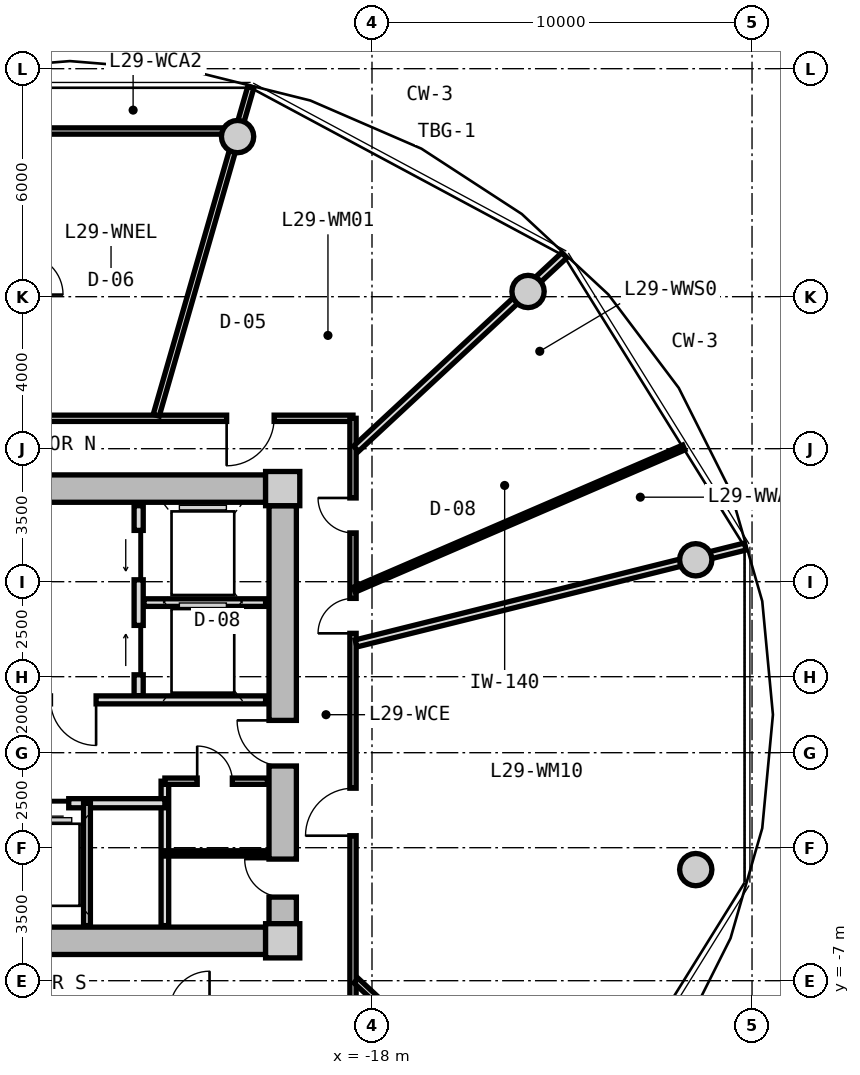
"""IFC4 building model, lengths in metres.
Left out: names, types, materials, properties, quantities, classifications, styles, units other than length and angle.
Written with IfcOpenShell. Run it as: python <this file> out.ifc"""

import sys

from ifc_helpers import new_model, si_unit, direction, frame, frame_2d, origin, origin_2d, place, context, subcontext, project, spatial, rectangle, circle, extrude, source, transform, mapped, element, fill, save


model = new_model("IFC4")
c1 = context("Model", 3, precision=1e-05, world=origin(), true_north=direction((0.0, 1.0)))
c2 = subcontext(c1, "Body", "Model", "MODEL_VIEW")
j1 = project(units=[si_unit("LENGTHUNIT", "METRE"), si_unit("PLANEANGLEUNIT", "RADIAN")], contexts=[c1])
p1 = place(None, origin())
s1 = spatial("IfcSite", under=j1, at=p1, CompositionType="ELEMENT")
p2 = place(p1, origin())
s2 = spatial("IfcBuilding", under=s1, at=p2, CompositionType="ELEMENT")
p3 = place(p2, frame((0.0, 0.0, 96.25)))
s3 = spatial("IfcBuildingStorey", under=s2, at=p3, CompositionType="ELEMENT", Elevation=96.25)
m1 = source(origin(), c2, "Body", "SweptSolid", [
    extrude(rectangle(XDim=0.9, YDim=0.9, at=origin_2d()), origin(), (0.0, 0.0, 1.0), 3.05),
])
for number, where, z_axis, x_axis in (
    (1, (-20.35, -5.95, 0.0), (0.0, 0.0, 1.0), (1.0, 0.0, 0.0)),
    (2, (-20.35, 5.95, 0.0), (0.0, 0.0, 1.0), (1.0, 0.0, 0.0)),
):
    element("IfcColumn", number, at=place(p3, frame(where, z_axis=z_axis, x_axis=x_axis)), inside=s3, PredefinedType="COLUMN", context=c2, shape_type="MappedRepresentation", body=[
        mapped(m1, transform((0.0, 0.0, 0.0), x_axis=(1.0, 0.0, 0.0), y_axis=(0.0, 1.0, 0.0), z_axis=(0.0, 0.0, 1.0), scale=1.0)),
    ])
m2 = source(origin(), c2, "Body", "SweptSolid", [
    extrude(rectangle(XDim=14.4, YDim=0.72, at=frame_2d((7.2, 0.0))), origin(), (0.0, 0.0, 1.0), 2.79),
])
for number, where, z_axis, x_axis in (
    (3, (-35.2, 5.95, 0.0), (0.0, 0.0, 1.0), (1.0, 0.0, 0.0)),
    (4, (-20.8, -5.95, 0.0), (0.0, 0.0, 1.0), (-1.0, 0.0, 0.0)),
):
    element("IfcWall", number, at=place(p3, frame(where, z_axis=z_axis, x_axis=x_axis)), inside=s3, PredefinedType="SHEAR", context=c2, shape_type="MappedRepresentation", body=[
        mapped(m2, transform((0.0, 0.0, 0.0), x_axis=(1.0, 0.0, 0.0), y_axis=(0.0, 1.0, 0.0), z_axis=(0.0, 0.0, 1.0), scale=1.0)),
    ])
m3 = source(origin(), c2, "Body", "SweptSolid", [
    extrude(rectangle(XDim=11.0, YDim=0.72, at=frame_2d((5.5, 0.0))), origin(), (0.0, 0.0, 1.0), 2.79),
])
p4 = place(p3, frame((-20.35, 5.5, 0.0), z_axis=(0.0, 0.0, 1.0), x_axis=(0.0, -1.0, 0.0)))
e5 = element("IfcWall", 5, at=p4, inside=s3, PredefinedType="SHEAR", context=c2, shape_type="MappedRepresentation", body=[
    mapped(m3, transform((0.0, 0.0, 0.0), x_axis=(1.0, 0.0, 0.0), y_axis=(0.0, 1.0, 0.0), z_axis=(0.0, 0.0, 1.0), scale=1.0)),
])
p5 = place(p4, frame((5.65, 0.0, 0.0)))
e6 = element("IfcOpeningElement", 6, at=p5, cuts=e5, PredefinedType="OPENING", context=c2, shape_type="SweptSolid", body=[
    extrude(rectangle(XDim=1.2, YDim=2.15, at=frame_2d((0.6, 1.075))), frame((0.0, 0.37, 0.0), z_axis=(0.0, -1.0, 0.0), x_axis=(1.0, 0.0, 0.0)), (0.0, 0.0, 1.0), 0.74),
])
p6 = place(p4, frame((9.3, 0.0, 0.0)))
e7 = element("IfcOpeningElement", 7, at=p6, cuts=e5, PredefinedType="OPENING", context=c2, shape_type="SweptSolid", body=[
    extrude(rectangle(XDim=1.0, YDim=2.1, at=frame_2d((0.5, 1.05))), frame((0.0, 0.37, 0.0), z_axis=(0.0, -1.0, 0.0), x_axis=(1.0, 0.0, 0.0)), (0.0, 0.0, 1.0), 0.74),
])
m4 = source(origin(), c2, "Body", "SweptSolid", [
    extrude(circle(Radius=0.425, at=origin_2d()), origin(), (0.0, 0.0, 1.0), 3.05),
])
for number, where, z_axis, x_axis in (
    (8, (-9.481, 4.076, 0.0), (0.0, 0.0, 1.0), (1.0, 0.0, 0.0)),
    (9, (-13.894, 11.137, 0.0), (0.0, 0.0, 1.0), (1.0, 0.0, 0.0)),
    (10, (-21.537, 15.213, 0.0), (0.0, 0.0, 1.0), (1.0, 0.0, 0.0)),
    (11, (-9.481, -4.076, 0.0), (0.0, 0.0, 1.0), (1.0, 0.0, 0.0)),
):
    element("IfcColumn", number, at=place(p3, frame(where, z_axis=z_axis, x_axis=x_axis)), inside=s3, PredefinedType="COLUMN", context=c2, shape_type="MappedRepresentation", body=[
        mapped(m4, transform((0.0, 0.0, 0.0), x_axis=(1.0, 0.0, 0.0), y_axis=(0.0, 1.0, 0.0), z_axis=(0.0, 0.0, 1.0), scale=1.0)),
    ])
m5 = source(origin(), c2, "Body", "SweptSolid", [
    extrude(rectangle(XDim=5.0, YDim=0.24, at=frame_2d((2.5, 0.0))), origin(), (0.0, 0.0, 1.0), 2.775),
])
p7 = place(p3, frame((-24.14, 0.5, 0.0), z_axis=(0.0, 0.0, 1.0), x_axis=(0.0, 1.0, 0.0)))
e12 = element("IfcWall", 12, at=p7, inside=s3, PredefinedType="PARTITIONING", context=c2, shape_type="MappedRepresentation", body=[
    mapped(m5, transform((0.0, 0.0, 0.0), x_axis=(1.0, 0.0, 0.0), y_axis=(0.0, 1.0, 0.0), z_axis=(0.0, 0.0, 1.0), scale=1.0)),
])
p8 = place(p7, frame((3.05, 0.0, 0.0)))
e13 = element("IfcOpeningElement", 13, at=p8, cuts=e12, PredefinedType="OPENING", context=c2, shape_type="SweptSolid", body=[
    extrude(rectangle(XDim=1.3, YDim=2.2, at=frame_2d((0.65, 1.1))), frame((0.0, 0.13, 0.0), z_axis=(0.0, -1.0, 0.0), x_axis=(1.0, 0.0, 0.0)), (0.0, 0.0, 1.0), 0.26),
])
p9 = place(p7, frame((0.55, 0.0, 0.0)))
e14 = element("IfcOpeningElement", 14, at=p9, cuts=e12, PredefinedType="OPENING", context=c2, shape_type="SweptSolid", body=[
    extrude(rectangle(XDim=1.3, YDim=2.2, at=frame_2d((0.65, 1.1))), frame((0.0, 0.13, 0.0), z_axis=(0.0, -1.0, 0.0), x_axis=(1.0, 0.0, 0.0)), (0.0, 0.0, 1.0), 0.26),
])
m6 = source(origin(), c2, "Body", "SweptSolid", [
    extrude(rectangle(XDim=3.2, YDim=0.2, at=frame_2d((1.6, 0.0))), origin(), (0.0, 0.0, 1.0), 2.775),
])
p10 = place(p3, frame((-24.0, 2.95, 0.0), z_axis=(0.0, 0.0, 1.0), x_axis=(1.0, 0.0, 0.0)))
e15 = element("IfcWall", 15, at=p10, inside=s3, PredefinedType="PARTITIONING", context=c2, shape_type="MappedRepresentation", body=[
    mapped(m6, transform((0.0, 0.0, 0.0), x_axis=(1.0, 0.0, 0.0), y_axis=(0.0, 1.0, 0.0), z_axis=(0.0, 0.0, 1.0), scale=1.0)),
])
m7 = source(origin(), c2, "Body", "SweptSolid", [
    extrude(rectangle(XDim=6.66, YDim=0.21, at=frame_2d((3.33, 0.0))), origin(), (0.0, 0.0, 1.0), 2.775),
])
p11 = place(p3, frame((-27.46, 0.39, 0.0), z_axis=(0.0, 0.0, 1.0), x_axis=(1.0, 0.0, 0.0)))
e16 = element("IfcWall", 16, at=p11, inside=s3, PredefinedType="PARTITIONING", context=c2, shape_type="MappedRepresentation", body=[
    mapped(m7, transform((0.0, 0.0, 0.0), x_axis=(1.0, 0.0, 0.0), y_axis=(0.0, 1.0, 0.0), z_axis=(0.0, 0.0, 1.0), scale=1.0)),
])
p12 = place(p11, frame((1.0, 0.0, 0.0)))
e17 = element("IfcOpeningElement", 17, at=p12, cuts=e16, PredefinedType="OPENING", context=c2, shape_type="SweptSolid", body=[
    extrude(rectangle(XDim=1.2, YDim=2.15, at=frame_2d((0.6, 1.075))), frame((0.0, 0.115, 0.0), z_axis=(0.0, -1.0, 0.0), x_axis=(1.0, 0.0, 0.0)), (0.0, 0.0, 1.0), 0.23),
])
m8 = source(origin(), c2, "Body", "SweptSolid", [
    extrude(rectangle(XDim=3.8, YDim=0.2, at=frame_2d((1.9, 0.0))), origin(), (0.0, 0.0, 1.0), 2.775),
])
p13 = place(p3, frame((-23.45, -5.55, 0.0), z_axis=(0.0, 0.0, 1.0), x_axis=(0.0, 1.0, 0.0)))
e18 = element("IfcWall", 18, at=p13, inside=s3, PredefinedType="PARTITIONING", context=c2, shape_type="MappedRepresentation", body=[
    mapped(m8, transform((0.0, 0.0, 0.0), x_axis=(1.0, 0.0, 0.0), y_axis=(0.0, 1.0, 0.0), z_axis=(0.0, 0.0, 1.0), scale=1.0)),
])
m9 = source(origin(), c2, "Body", "SweptSolid", [
    extrude(rectangle(XDim=4.13, YDim=0.24, at=frame_2d((2.065, 0.0))), origin(), (0.0, 0.0, 1.0), 2.775),
])
p14 = place(p3, frame((-27.58, -2.33, 0.0), z_axis=(0.0, 0.0, 1.0), x_axis=(1.0, 0.0, 0.0)))
e19 = element("IfcWall", 19, at=p14, inside=s3, PredefinedType="PARTITIONING", context=c2, shape_type="MappedRepresentation", body=[
    mapped(m9, transform((0.0, 0.0, 0.0), x_axis=(1.0, 0.0, 0.0), y_axis=(0.0, 1.0, 0.0), z_axis=(0.0, 0.0, 1.0), scale=1.0)),
])
p15 = place(p14, frame((0.5, 0.0, 0.0)))
e20 = element("IfcOpeningElement", 20, at=p15, cuts=e19, PredefinedType="OPENING", context=c2, shape_type="SweptSolid", body=[
    extrude(rectangle(XDim=1.1, YDim=2.2, at=frame_2d((0.55, 1.1))), frame((0.0, 0.13, 0.0), z_axis=(0.0, -1.0, 0.0), x_axis=(1.0, 0.0, 0.0)), (0.0, 0.0, 1.0), 0.26),
])
m10 = source(origin(), c2, "Body", "SweptSolid", [
    extrude(rectangle(XDim=3.22, YDim=0.18, at=frame_2d((1.61, 0.0))), origin(), (0.0, 0.0, 1.0), 2.775),
])
p16 = place(p3, frame((-25.5, -5.55, 0.0), z_axis=(0.0, 0.0, 1.0), x_axis=(0.0, 1.0, 0.0)))
e21 = element("IfcWall", 21, at=p16, inside=s3, PredefinedType="PARTITIONING", context=c2, shape_type="MappedRepresentation", body=[
    mapped(m10, transform((0.0, 0.0, 0.0), x_axis=(1.0, 0.0, 0.0), y_axis=(0.0, 1.0, 0.0), z_axis=(0.0, 0.0, 1.0), scale=1.0)),
])
m11 = source(origin(), c2, "Body", "SweptSolid", [
    extrude(rectangle(XDim=2.7, YDim=0.165, at=frame_2d((1.35, 0.0))), origin(), (0.0, 0.0, 1.0), 2.775),
])
p17 = place(p3, frame((-23.45, -1.75, 0.0), z_axis=(0.0, 0.0, 1.0), x_axis=(1.0, 0.0, 0.0)))
e22 = element("IfcWall", 22, at=p17, inside=s3, PredefinedType="PARTITIONING", context=c2, shape_type="MappedRepresentation", body=[
    mapped(m11, transform((0.0, 0.0, 0.0), x_axis=(1.0, 0.0, 0.0), y_axis=(0.0, 1.0, 0.0), z_axis=(0.0, 0.0, 1.0), scale=1.0)),
])
p18 = place(p17, frame((0.85, 0.0, 0.0)))
e23 = element("IfcOpeningElement", 23, at=p18, cuts=e22, PredefinedType="OPENING", context=c2, shape_type="SweptSolid", body=[
    extrude(rectangle(XDim=0.925, YDim=2.1, at=frame_2d((0.462, 1.05))), frame((0.0, 0.093, 0.0), z_axis=(0.0, -1.0, 0.0), x_axis=(1.0, 0.0, 0.0)), (0.0, 0.0, 1.0), 0.185),
])
m12 = source(origin(), c2, "Body", "SweptSolid", [
    extrude(rectangle(XDim=2.7, YDim=0.14, at=frame_2d((1.35, 0.0))), origin(), (0.0, 0.0, 1.0), 2.775),
])
p19 = place(p3, frame((-23.45, -3.65, 0.0), z_axis=(0.0, 0.0, 1.0), x_axis=(1.0, 0.0, 0.0)))
e24 = element("IfcWall", 24, at=p19, inside=s3, PredefinedType="PARTITIONING", context=c2, shape_type="MappedRepresentation", body=[
    mapped(m12, transform((0.0, 0.0, 0.0), x_axis=(1.0, 0.0, 0.0), y_axis=(0.0, 1.0, 0.0), z_axis=(0.0, 0.0, 1.0), scale=1.0)),
])
m13 = source(origin(), c2, "Body", "SweptSolid", [
    extrude(rectangle(XDim=8.6, YDim=0.165, at=frame_2d((4.3, 0.0))), origin(), (0.0, 0.0, 1.0), 2.775),
])
p20 = place(p3, frame((-27.1, 7.8, 0.0), z_axis=(0.0, 0.0, 1.0), x_axis=(1.0, 0.0, 0.0)))
e25 = element("IfcWall", 25, at=p20, inside=s3, PredefinedType="PARTITIONING", context=c2, shape_type="MappedRepresentation", body=[
    mapped(m13, transform((0.0, 0.0, 0.0), x_axis=(1.0, 0.0, 0.0), y_axis=(0.0, 1.0, 0.0), z_axis=(0.0, 0.0, 1.0), scale=1.0)),
])
p21 = place(p20, frame((5.275, 0.0, 0.0)))
e26 = element("IfcOpeningElement", 26, at=p21, cuts=e25, PredefinedType="OPENING", context=c2, shape_type="SweptSolid", body=[
    extrude(rectangle(XDim=1.25, YDim=2.2, at=frame_2d((0.625, 1.1))), frame((0.0, 0.093, 0.0), z_axis=(0.0, -1.0, 0.0), x_axis=(1.0, 0.0, 0.0)), (0.0, 0.0, 1.0), 0.185),
])
m14 = source(origin(), c2, "Body", "SweptSolid", [
    extrude(rectangle(XDim=15.6, YDim=0.165, at=frame_2d((7.8, 0.0))), origin(), (0.0, 0.0, 1.0), 2.775),
])
p22 = place(p3, frame((-18.5, 7.8, 0.0), z_axis=(0.0, 0.0, 1.0), x_axis=(0.0, -1.0, 0.0)))
e27 = element("IfcWall", 27, at=p22, inside=s3, PredefinedType="PARTITIONING", context=c2, shape_type="MappedRepresentation", body=[
    mapped(m14, transform((0.0, 0.0, 0.0), x_axis=(1.0, 0.0, 0.0), y_axis=(0.0, 1.0, 0.0), z_axis=(0.0, 0.0, 1.0), scale=1.0)),
])
p23 = place(p22, frame((9.734, 0.0, 0.0)))
e28 = element("IfcOpeningElement", 28, at=p23, cuts=e27, PredefinedType="OPENING", context=c2, shape_type="SweptSolid", body=[
    extrude(rectangle(XDim=1.25, YDim=2.2, at=frame_2d((0.625, 1.1))), frame((0.0, 0.093, 0.0), z_axis=(0.0, -1.0, 0.0), x_axis=(1.0, 0.0, 0.0)), (0.0, 0.0, 1.0), 0.185),
])
p24 = place(p22, frame((4.739, 0.0, 0.0)))
e29 = element("IfcOpeningElement", 29, at=p24, cuts=e27, PredefinedType="OPENING", context=c2, shape_type="SweptSolid", body=[
    extrude(rectangle(XDim=0.92, YDim=2.1, at=frame_2d((0.46, 1.05))), frame((0.0, 0.093, 0.0), z_axis=(0.0, -1.0, 0.0), x_axis=(1.0, 0.0, 0.0)), (0.0, 0.0, 1.0), 0.185),
])
p25 = place(p22, frame((2.096, 0.0, 0.0)))
e30 = element("IfcOpeningElement", 30, at=p25, cuts=e27, PredefinedType="OPENING", context=c2, shape_type="SweptSolid", body=[
    extrude(rectangle(XDim=0.92, YDim=2.1, at=frame_2d((0.46, 1.05))), frame((0.0, 0.093, 0.0), z_axis=(0.0, -1.0, 0.0), x_axis=(1.0, 0.0, 0.0)), (0.0, 0.0, 1.0), 0.185),
])
m15 = source(origin(), c2, "Body", "SweptSolid", [
    extrude(rectangle(XDim=8.989, YDim=0.165, at=frame_2d((4.495, 0.0))), origin(), (0.0, 0.0, 1.0), 2.275),
])
p26 = place(p3, frame((-23.678, 7.88, 0.0), z_axis=(0.0, 0.0, 1.0), x_axis=(0.27702323008, 0.960863221274, 0.0)))
e31 = element("IfcWall", 31, at=p26, inside=s3, PredefinedType="PARTITIONING", context=c2, shape_type="MappedRepresentation", body=[
    mapped(m15, transform((0.0, 0.0, 0.0), x_axis=(1.0, 0.0, 0.0), y_axis=(0.0, 1.0, 0.0), z_axis=(0.0, 0.0, 1.0), scale=1.0)),
])
m16 = source(origin(), c2, "Body", "SweptSolid", [
    extrude(rectangle(XDim=7.482, YDim=0.165, at=frame_2d((3.741, 0.0))), origin(), (0.0, 0.0, 1.0), 2.275),
])
p27 = place(p3, frame((-18.42, -6.998, 0.0), z_axis=(0.0, 0.0, 1.0), x_axis=(0.732508698043, -0.680757671489, 0.0)))
e32 = element("IfcWall", 32, at=p27, inside=s3, PredefinedType="PARTITIONING", context=c2, shape_type="MappedRepresentation", body=[
    mapped(m16, transform((0.0, 0.0, 0.0), x_axis=(1.0, 0.0, 0.0), y_axis=(0.0, 1.0, 0.0), z_axis=(0.0, 0.0, 1.0), scale=1.0)),
])
m17 = source(origin(), c2, "Body", "SweptSolid", [
    extrude(rectangle(XDim=5.814, YDim=0.165, at=frame_2d((2.907, 0.0))), origin(), (0.0, 0.0, 1.0), 2.275),
])
p28 = place(p3, frame((-27.18, 15.36, 0.0), z_axis=(0.0, 0.0, 1.0), x_axis=(1.0, 0.0, 0.0)))
e33 = element("IfcWall", 33, at=p28, inside=s3, PredefinedType="PARTITIONING", context=c2, shape_type="MappedRepresentation", body=[
    mapped(m17, transform((0.0, 0.0, 0.0), x_axis=(1.0, 0.0, 0.0), y_axis=(0.0, 1.0, 0.0), z_axis=(0.0, 0.0, 1.0), scale=1.0)),
])
m18 = source(origin(), c2, "Body", "SweptSolid", [
    extrude(rectangle(XDim=10.556, YDim=0.19, at=frame_2d((5.278, 0.0))), origin(), (0.0, 0.0, 1.0), 2.275),
])
p29 = place(p3, frame((-18.42, 1.875, 0.0), z_axis=(0.0, 0.0, 1.0), x_axis=(0.970363857851, 0.241648470667, 0.0)))
e34 = element("IfcWall", 34, at=p29, inside=s3, PredefinedType="PARTITIONING", context=c2, shape_type="MappedRepresentation", body=[
    mapped(m18, transform((0.0, 0.0, 0.0), x_axis=(1.0, 0.0, 0.0), y_axis=(0.0, 1.0, 0.0), z_axis=(0.0, 0.0, 1.0), scale=1.0)),
])
m19 = source(origin(), c2, "Body", "SweptSolid", [
    extrude(rectangle(XDim=7.482, YDim=0.19, at=frame_2d((3.741, 0.0))), origin(), (0.0, 0.0, 1.0), 2.275),
])
p30 = place(p3, frame((-18.42, 6.998, 0.0), z_axis=(0.0, 0.0, 1.0), x_axis=(0.732508698043, 0.680757671489, 0.0)))
e35 = element("IfcWall", 35, at=p30, inside=s3, PredefinedType="PARTITIONING", context=c2, shape_type="MappedRepresentation", body=[
    mapped(m19, transform((0.0, 0.0, 0.0), x_axis=(1.0, 0.0, 0.0), y_axis=(0.0, 1.0, 0.0), z_axis=(0.0, 0.0, 1.0), scale=1.0)),
])
m20 = source(origin(), c2, "Body", "SweptSolid", [
    extrude(rectangle(XDim=9.447, YDim=0.14, at=frame_2d((4.724, 0.0))), origin(), (0.0, 0.0, 1.0), 2.775),
])
p31 = place(p3, frame((-18.47, 3.289, 0.0), z_axis=(0.0, 0.0, 1.0), x_axis=(0.918162367414, 0.396204324894, 0.0)))
e36 = element("IfcWall", 36, at=p31, inside=s3, PredefinedType="PARTITIONING", context=c2, shape_type="MappedRepresentation", body=[
    mapped(m20, transform((0.0, 0.0, 0.0), x_axis=(1.0, 0.0, 0.0), y_axis=(0.0, 1.0, 0.0), z_axis=(0.0, 0.0, 1.0), scale=1.0)),
])
m21 = source(origin(), c2, "Body", "SweptSolid", [
    extrude(rectangle(XDim=1.3, YDim=2.2, at=frame_2d((0.65, 1.1))), frame((0.0, 0.025, 0.0), z_axis=(0.0, -1.0, 0.0), x_axis=(1.0, 0.0, 0.0)), (0.0, 0.0, 1.0), 0.05),
])
p32 = place(p8, origin())
e37 = element("IfcDoor", 37, at=p32, inside=s3, OperationType="SLIDING_TO_LEFT", PredefinedType="DOOR", context=c2, shape_type="MappedRepresentation", body=[
    mapped(m21, transform((0.0, 0.0, 0.0), x_axis=(1.0, 0.0, 0.0), y_axis=(0.0, 1.0, 0.0), z_axis=(0.0, 0.0, 1.0), scale=1.0)),
])
fill(e13, e37)
p33 = place(p9, origin())
e38 = element("IfcDoor", 38, at=p33, inside=s3, OperationType="SLIDING_TO_RIGHT", PredefinedType="DOOR", context=c2, shape_type="MappedRepresentation", body=[
    mapped(m21, transform((0.0, 0.0, 0.0), x_axis=(1.0, 0.0, 0.0), y_axis=(0.0, 1.0, 0.0), z_axis=(0.0, 0.0, 1.0), scale=1.0)),
])
fill(e14, e38)
m22 = source(origin(), c2, "Body", "SweptSolid", [
    extrude(rectangle(XDim=1.2, YDim=2.15, at=frame_2d((0.6, 1.075))), frame((0.0, 0.025, 0.0), z_axis=(0.0, -1.0, 0.0), x_axis=(1.0, 0.0, 0.0)), (0.0, 0.0, 1.0), 0.05),
])
p34 = place(p12, frame((1.2, 0.0, 0.0), z_axis=(0.0, 0.0, 1.0), x_axis=(-1.0, 0.0, 0.0)))
e39 = element("IfcDoor", 39, at=p34, inside=s3, OperationType="SINGLE_SWING_LEFT", PredefinedType="DOOR", context=c2, shape_type="MappedRepresentation", body=[
    mapped(m22, transform((0.0, 0.0, 0.0), x_axis=(1.0, 0.0, 0.0), y_axis=(0.0, 1.0, 0.0), z_axis=(0.0, 0.0, 1.0), scale=1.0)),
])
fill(e17, e39)
p35 = place(p5, frame((1.2, 0.0, 0.0), z_axis=(0.0, 0.0, 1.0), x_axis=(-1.0, 0.0, 0.0)))
e40 = element("IfcDoor", 40, at=p35, inside=s3, OperationType="SINGLE_SWING_RIGHT", PredefinedType="DOOR", context=c2, shape_type="MappedRepresentation", body=[
    mapped(m22, transform((0.0, 0.0, 0.0), x_axis=(1.0, 0.0, 0.0), y_axis=(0.0, 1.0, 0.0), z_axis=(0.0, 0.0, 1.0), scale=1.0)),
])
fill(e6, e40)
m23 = source(origin(), c2, "Body", "SweptSolid", [
    extrude(rectangle(XDim=1.1, YDim=2.2, at=frame_2d((0.55, 1.1))), frame((0.0, 0.025, 0.0), z_axis=(0.0, -1.0, 0.0), x_axis=(1.0, 0.0, 0.0)), (0.0, 0.0, 1.0), 0.05),
])
p36 = place(p15, frame((1.1, 0.0, 0.0), z_axis=(0.0, 0.0, 1.0), x_axis=(-1.0, 0.0, 0.0)))
e41 = element("IfcDoor", 41, at=p36, inside=s3, OperationType="SLIDING_TO_LEFT", PredefinedType="DOOR", context=c2, shape_type="MappedRepresentation", body=[
    mapped(m23, transform((0.0, 0.0, 0.0), x_axis=(1.0, 0.0, 0.0), y_axis=(0.0, 1.0, 0.0), z_axis=(0.0, 0.0, 1.0), scale=1.0)),
])
fill(e20, e41)
m24 = source(origin(), c2, "Body", "SweptSolid", [
    extrude(rectangle(XDim=0.925, YDim=2.1, at=frame_2d((0.462, 1.05))), frame((0.0, 0.025, 0.0), z_axis=(0.0, -1.0, 0.0), x_axis=(1.0, 0.0, 0.0)), (0.0, 0.0, 1.0), 0.05),
])
p37 = place(p18, origin())
e42 = element("IfcDoor", 42, at=p37, inside=s3, OperationType="SINGLE_SWING_LEFT", PredefinedType="DOOR", context=c2, shape_type="MappedRepresentation", body=[
    mapped(m24, transform((0.0, 0.0, 0.0), x_axis=(1.0, 0.0, 0.0), y_axis=(0.0, 1.0, 0.0), z_axis=(0.0, 0.0, 1.0), scale=1.0)),
])
fill(e23, e42)
m25 = source(origin(), c2, "Body", "SweptSolid", [
    extrude(rectangle(XDim=1.0, YDim=2.1, at=frame_2d((0.5, 1.05))), frame((0.0, 0.025, 0.0), z_axis=(0.0, -1.0, 0.0), x_axis=(1.0, 0.0, 0.0)), (0.0, 0.0, 1.0), 0.05),
])
p38 = place(p6, frame((1.0, 0.0, 0.0), z_axis=(0.0, 0.0, 1.0), x_axis=(-1.0, 0.0, 0.0)))
e43 = element("IfcDoor", 43, at=p38, inside=s3, OperationType="SINGLE_SWING_RIGHT", PredefinedType="DOOR", context=c2, shape_type="MappedRepresentation", body=[
    mapped(m25, transform((0.0, 0.0, 0.0), x_axis=(1.0, 0.0, 0.0), y_axis=(0.0, 1.0, 0.0), z_axis=(0.0, 0.0, 1.0), scale=1.0)),
])
fill(e7, e43)
m26 = source(origin(), c2, "Body", "SweptSolid", [
    extrude(rectangle(XDim=1.25, YDim=2.2, at=frame_2d((0.625, 1.1))), frame((0.0, 0.025, 0.0), z_axis=(0.0, -1.0, 0.0), x_axis=(1.0, 0.0, 0.0)), (0.0, 0.0, 1.0), 0.05),
])
p39 = place(p23, frame((1.25, 0.0, 0.0), z_axis=(0.0, 0.0, 1.0), x_axis=(-1.0, 0.0, 0.0)))
e44 = element("IfcDoor", 44, at=p39, inside=s3, OperationType="SINGLE_SWING_LEFT", PredefinedType="DOOR", context=c2, shape_type="MappedRepresentation", body=[
    mapped(m26, transform((0.0, 0.0, 0.0), x_axis=(1.0, 0.0, 0.0), y_axis=(0.0, 1.0, 0.0), z_axis=(0.0, 0.0, 1.0), scale=1.0)),
])
fill(e28, e44)
m27 = source(origin(), c2, "Body", "SweptSolid", [
    extrude(rectangle(XDim=0.92, YDim=2.1, at=frame_2d((0.46, 1.05))), frame((0.0, 0.025, 0.0), z_axis=(0.0, -1.0, 0.0), x_axis=(1.0, 0.0, 0.0)), (0.0, 0.0, 1.0), 0.05),
])
p40 = place(p24, frame((0.92, 0.0, 0.0), z_axis=(0.0, 0.0, 1.0), x_axis=(-1.0, 0.0, 0.0)))
e45 = element("IfcDoor", 45, at=p40, inside=s3, OperationType="SINGLE_SWING_LEFT", PredefinedType="DOOR", context=c2, shape_type="MappedRepresentation", body=[
    mapped(m27, transform((0.0, 0.0, 0.0), x_axis=(1.0, 0.0, 0.0), y_axis=(0.0, 1.0, 0.0), z_axis=(0.0, 0.0, 1.0), scale=1.0)),
])
fill(e29, e45)
p41 = place(p25, frame((0.92, 0.0, 0.0), z_axis=(0.0, 0.0, 1.0), x_axis=(-1.0, 0.0, 0.0)))
e46 = element("IfcDoor", 46, at=p41, inside=s3, OperationType="SINGLE_SWING_RIGHT", PredefinedType="DOOR", context=c2, shape_type="MappedRepresentation", body=[
    mapped(m27, transform((0.0, 0.0, 0.0), x_axis=(1.0, 0.0, 0.0), y_axis=(0.0, 1.0, 0.0), z_axis=(0.0, 0.0, 1.0), scale=1.0)),
])
fill(e30, e46)
p42 = place(p21, frame((1.25, 0.0, 0.0), z_axis=(0.0, 0.0, 1.0), x_axis=(-1.0, 0.0, 0.0)))
e47 = element("IfcDoor", 47, at=p42, inside=s3, OperationType="SINGLE_SWING_RIGHT", PredefinedType="DOOR", context=c2, shape_type="MappedRepresentation", body=[
    mapped(m26, transform((0.0, 0.0, 0.0), x_axis=(1.0, 0.0, 0.0), y_axis=(0.0, 1.0, 0.0), z_axis=(0.0, 0.0, 1.0), scale=1.0)),
])
fill(e26, e47)
save(model, sys.argv[1])
